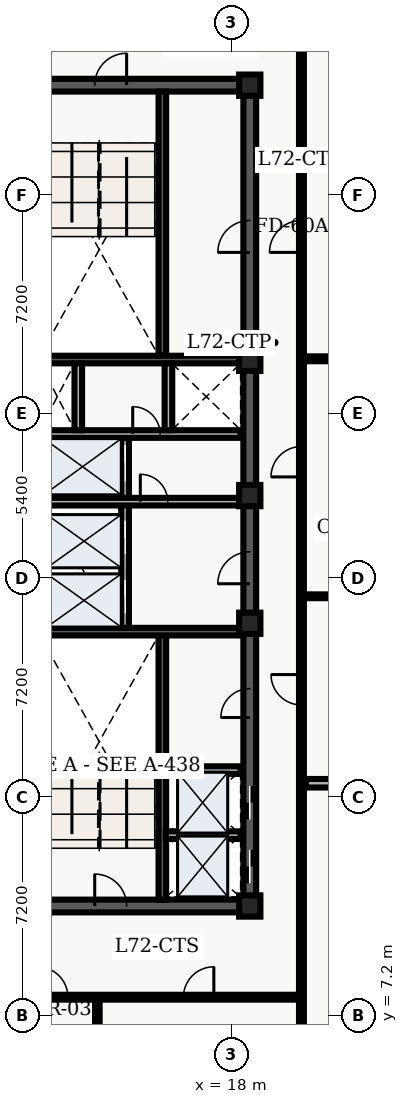
"""IFC4 building model, lengths in metres.
Left out: names, types, materials, properties, quantities, classifications, styles, units other than length and angle.
Written with IfcOpenShell. Run it as: python <this file> out.ifc"""

import sys

from ifc_helpers import new_model, entity, si_unit, converted_unit, direction, frame, origin_with_axes, origin_2d_with_axis, place, context, subcontext, project, spatial, polyline, rectangle, outline, extrude, element, fill, save


model = new_model("IFC4")
c1 = context("Model", 3, precision=1e-05, world=origin_with_axes(), true_north=direction((0.0, 1.0)))
c2 = subcontext(c1, "Body", "Model", "MODEL_VIEW")
j1 = project(units=[si_unit("LENGTHUNIT", "METRE"), converted_unit("PLANEANGLEUNIT", "DEGREE", entity("IfcPlaneAngleMeasure", 0.017), si_unit("PLANEANGLEUNIT", "RADIAN"), dimensions=[0, 0, 0, 0, 0, 0, 0])], contexts=[c1])
p1 = place(None, origin_with_axes())
s1 = spatial("IfcSite", under=j1, at=p1, CompositionType="ELEMENT")
p2 = place(p1, origin_with_axes())
s2 = spatial("IfcBuilding", under=s1, at=p2, CompositionType="ELEMENT")
p3 = place(p2, frame((0.0, 0.0, 291.9), z_axis=(0.0, 0.0, 1.0), x_axis=(1.0, 0.0, 0.0)))
s3 = spatial("IfcBuildingStorey", under=s2, at=p3, CompositionType="ELEMENT", Elevation=291.9)
p4 = place(p3, frame((11.4, 10.8, 0.0), z_axis=(0.0, 0.0, 1.0), x_axis=(1.0, 0.0, 0.0)))
e1 = element("IfcWall", 1, at=p4, inside=s3, PredefinedType="SHEAR", context=c2, shape_type="SweptSolid", body=[
    extrude(outline(polyline([(0.0, -0.21), (7.2, -0.21), (7.2, 0.21), (0.0, 0.21), (0.0, -0.21)])), origin_with_axes(), (0.0, 0.0, 1.0), 3.66),
])
p5 = place(p4, frame((2.625, 0.0, 0.0), z_axis=(0.0, 0.0, 1.0), x_axis=(1.0, 0.0, 0.0)))
e2 = element("IfcOpeningElement", 2, at=p5, cuts=e1, PredefinedType="OPENING", context=c2, shape_type="SweptSolid", body=[
    extrude(rectangle(XDim=1.05, YDim=0.44, at=origin_2d_with_axis()), origin_with_axes(), (0.0, 0.0, 1.0), 2.15),
])
p6 = place(p3, frame((11.4, 37.8, 0.0), z_axis=(0.0, 0.0, 1.0), x_axis=(1.0, 0.0, 0.0)))
e3 = element("IfcWall", 3, at=p6, inside=s3, PredefinedType="SHEAR", context=c2, shape_type="SweptSolid", body=[
    extrude(outline(polyline([(0.0, -0.21), (7.2, -0.21), (7.2, 0.21), (0.0, 0.21), (0.0, -0.21)])), origin_with_axes(), (0.0, 0.0, 1.0), 3.66),
])
p7 = place(p6, frame((2.625, 0.0, 0.0), z_axis=(0.0, 0.0, 1.0), x_axis=(1.0, 0.0, 0.0)))
e4 = element("IfcOpeningElement", 4, at=p7, cuts=e3, PredefinedType="OPENING", context=c2, shape_type="SweptSolid", body=[
    extrude(rectangle(XDim=1.05, YDim=0.44, at=origin_2d_with_axis()), origin_with_axes(), (0.0, 0.0, 1.0), 2.15),
])
p8 = place(p3, frame((18.6, 10.8, 0.0), z_axis=(0.0, 0.0, 1.0), x_axis=(0.0, 1.0, 0.0)))
e5 = element("IfcWall", 5, at=p8, inside=s3, PredefinedType="SHEAR", context=c2, shape_type="SweptSolid", body=[
    extrude(outline(polyline([(0.0, -0.21), (13.5, -0.21), (13.5, 0.21), (0.0, 0.21), (0.0, -0.21)])), origin_with_axes(), (0.0, 0.0, 1.0), 3.66),
])
p9 = place(p8, frame((1.3, 0.0, 0.0), z_axis=(0.0, 0.0, 1.0), x_axis=(1.0, 0.0, 0.0)))
e6 = element("IfcOpeningElement", 6, at=p9, cuts=e5, PredefinedType="OPENING", context=c2, shape_type="SweptSolid", body=[
    extrude(rectangle(XDim=1.1, YDim=0.44, at=origin_2d_with_axis()), origin_with_axes(), (0.0, 0.0, 1.0), 2.15),
])
p10 = place(p8, frame((3.4, 0.0, 0.0), z_axis=(0.0, 0.0, 1.0), x_axis=(1.0, 0.0, 0.0)))
e7 = element("IfcOpeningElement", 7, at=p10, cuts=e5, PredefinedType="OPENING", context=c2, shape_type="SweptSolid", body=[
    extrude(rectangle(XDim=1.1, YDim=0.44, at=origin_2d_with_axis()), origin_with_axes(), (0.0, 0.0, 1.0), 2.15),
])
p11 = place(p8, frame((11.125, 0.0, 0.0), z_axis=(0.0, 0.0, 1.0), x_axis=(1.0, 0.0, 0.0)))
e8 = element("IfcOpeningElement", 8, at=p11, cuts=e5, PredefinedType="OPENING", context=c2, shape_type="SweptSolid", body=[
    extrude(rectangle(XDim=1.05, YDim=0.44, at=origin_2d_with_axis()), origin_with_axes(), (0.0, 0.0, 1.0), 2.15),
])
p12 = place(p8, frame((6.675, 0.0, 0.0), z_axis=(0.0, 0.0, 1.0), x_axis=(1.0, 0.0, 0.0)))
e9 = element("IfcOpeningElement", 9, at=p12, cuts=e5, PredefinedType="OPENING", context=c2, shape_type="SweptSolid", body=[
    extrude(rectangle(XDim=0.95, YDim=0.44, at=origin_2d_with_axis()), origin_with_axes(), (0.0, 0.0, 1.0), 2.15),
])
p13 = place(p3, frame((18.6, 24.3, 0.0), z_axis=(0.0, 0.0, 1.0), x_axis=(0.0, 1.0, 0.0)))
e10 = element("IfcWall", 10, at=p13, inside=s3, PredefinedType="SHEAR", context=c2, shape_type="SweptSolid", body=[
    extrude(outline(polyline([(0.0, -0.21), (13.5, -0.21), (13.5, 0.21), (0.0, 0.21), (0.0, -0.21)])), origin_with_axes(), (0.0, 0.0, 1.0), 3.66),
])
p14 = place(p13, frame((8.525, 0.0, 0.0), z_axis=(0.0, 0.0, 1.0), x_axis=(1.0, 0.0, 0.0)))
e11 = element("IfcOpeningElement", 11, at=p14, cuts=e10, PredefinedType="OPENING", context=c2, shape_type="SweptSolid", body=[
    extrude(rectangle(XDim=1.05, YDim=0.44, at=origin_2d_with_axis()), origin_with_axes(), (0.0, 0.0, 1.0), 2.15),
])
p15 = place(p3, frame((15.725, 11.01, 0.0), z_axis=(0.0, 0.0, 1.0), x_axis=(0.0, 1.0, 0.0)))
e12 = element("IfcWall", 12, at=p15, inside=s3, PredefinedType="SHEAR", context=c2, shape_type="SweptSolid", body=[
    extrude(outline(polyline([(0.0, -0.125), (8.69, -0.125), (8.69, 0.125), (0.0, 0.125), (0.0, -0.125)])), origin_with_axes(), (0.0, 0.0, 1.0), 3.66),
])
p16 = place(p3, frame((11.61, 19.825, 0.0), z_axis=(0.0, 0.0, 1.0), x_axis=(1.0, 0.0, 0.0)))
e13 = element("IfcWall", 13, at=p16, inside=s3, PredefinedType="SHEAR", context=c2, shape_type="SweptSolid", body=[
    extrude(outline(polyline([(0.0, -0.125), (6.78, -0.125), (6.78, 0.125), (0.0, 0.125), (0.0, -0.125)])), origin_with_axes(), (0.0, 0.0, 1.0), 3.66),
])
p17 = place(p3, frame((15.725, 28.9, 0.0), z_axis=(0.0, 0.0, 1.0), x_axis=(0.0, 1.0, 0.0)))
e14 = element("IfcWall", 14, at=p17, inside=s3, PredefinedType="SHEAR", context=c2, shape_type="SweptSolid", body=[
    extrude(outline(polyline([(0.0, -0.125), (8.69, -0.125), (8.69, 0.125), (0.0, 0.125), (0.0, -0.125)])), origin_with_axes(), (0.0, 0.0, 1.0), 3.66),
])
p18 = place(p3, frame((11.61, 28.775, 0.0), z_axis=(0.0, 0.0, 1.0), x_axis=(1.0, 0.0, 0.0)))
e15 = element("IfcWall", 15, at=p18, inside=s3, PredefinedType="SHEAR", context=c2, shape_type="SweptSolid", body=[
    extrude(outline(polyline([(0.0, -0.125), (6.78, -0.125), (6.78, 0.125), (0.0, 0.125), (0.0, -0.125)])), origin_with_axes(), (0.0, 0.0, 1.0), 3.66),
])
p19 = place(p3, frame((14.5, 19.95, 0.0), z_axis=(0.0, 0.0, 1.0), x_axis=(0.0, 1.0, 0.0)))
e16 = element("IfcWall", 16, at=p19, inside=s3, PredefinedType="SOLIDWALL", context=c2, shape_type="SweptSolid", body=[
    extrude(outline(polyline([(0.0, -0.125), (6.25, -0.125), (6.25, 0.125), (0.0, 0.125), (0.0, -0.125)])), origin_with_axes(), (0.0, 0.0, 1.0), 2.7),
])
p20 = place(p19, frame((1.025, 0.0, 0.0), z_axis=(0.0, 0.0, 1.0), x_axis=(1.0, 0.0, 0.0)))
e17 = element("IfcOpeningElement", 17, at=p20, cuts=e16, PredefinedType="OPENING", context=c2, shape_type="SweptSolid", body=[
    extrude(rectangle(XDim=1.1, YDim=0.27, at=origin_2d_with_axis()), origin_with_axes(), (0.0, 0.0, 1.0), 2.15),
])
p21 = place(p19, frame((2.975, 0.0, 0.0), z_axis=(0.0, 0.0, 1.0), x_axis=(1.0, 0.0, 0.0)))
e18 = element("IfcOpeningElement", 18, at=p21, cuts=e16, PredefinedType="OPENING", context=c2, shape_type="SweptSolid", body=[
    extrude(rectangle(XDim=1.1, YDim=0.27, at=origin_2d_with_axis()), origin_with_axes(), (0.0, 0.0, 1.0), 2.15),
])
p22 = place(p19, frame((5.425, 0.0, 0.0), z_axis=(0.0, 0.0, 1.0), x_axis=(1.0, 0.0, 0.0)))
e19 = element("IfcOpeningElement", 19, at=p22, cuts=e16, PredefinedType="OPENING", context=c2, shape_type="SweptSolid", body=[
    extrude(rectangle(XDim=1.2, YDim=0.27, at=origin_2d_with_axis()), origin_with_axes(), (0.0, 0.0, 1.0), 2.15),
])
p23 = place(p3, frame((11.7, 24.1, 0.0), z_axis=(0.0, 0.0, 1.0), x_axis=(1.0, 0.0, 0.0)))
e20 = element("IfcWall", 20, at=p23, inside=s3, PredefinedType="SOLIDWALL", context=c2, shape_type="SweptSolid", body=[
    extrude(outline(polyline([(0.0, -0.125), (6.6, -0.125), (6.6, 0.125), (0.0, 0.125), (0.0, -0.125)])), origin_with_axes(), (0.0, 0.0, 1.0), 2.7),
])
p24 = place(p23, frame((3.75, 0.0, 0.0), z_axis=(0.0, 0.0, 1.0), x_axis=(1.0, 0.0, 0.0)))
e21 = element("IfcOpeningElement", 21, at=p24, cuts=e20, PredefinedType="OPENING", context=c2, shape_type="SweptSolid", body=[
    extrude(rectangle(XDim=0.9, YDim=0.27, at=origin_2d_with_axis()), origin_with_axes(), (0.0, 0.0, 1.0), 2.15),
])
p25 = place(p3, frame((11.7, 26.325, 0.0), z_axis=(0.0, 0.0, 1.0), x_axis=(1.0, 0.0, 0.0)))
e22 = element("IfcWall", 22, at=p25, inside=s3, PredefinedType="SOLIDWALL", context=c2, shape_type="SweptSolid", body=[
    extrude(outline(polyline([(0.0, -0.125), (6.6, -0.125), (6.6, 0.125), (0.0, 0.125), (0.0, -0.125)])), origin_with_axes(), (0.0, 0.0, 1.0), 2.7),
])
p26 = place(p25, frame((3.5, 0.0, 0.0), z_axis=(0.0, 0.0, 1.0), x_axis=(1.0, 0.0, 0.0)))
e23 = element("IfcOpeningElement", 23, at=p26, cuts=e22, PredefinedType="OPENING", context=c2, shape_type="SweptSolid", body=[
    extrude(rectangle(XDim=0.9, YDim=0.27, at=origin_2d_with_axis()), origin_with_axes(), (0.0, 0.0, 1.0), 2.15),
])
for number, where, z_axis, x_axis in (
    (24, (12.96, 26.45, 0.0), (0.0, 0.0, 1.0), (0.0, 1.0, 0.0)),
    (25, (15.925, 26.45, 0.0), (0.0, 0.0, 1.0), (0.0, 1.0, 0.0)),
):
    element("IfcWall", number, at=place(p3, frame(where, z_axis=z_axis, x_axis=x_axis)), inside=s3, PredefinedType="SOLIDWALL", context=c2, shape_type="SweptSolid", body=[
        extrude(outline(polyline([(0.0, -0.125), (2.2, -0.125), (2.2, 0.125), (0.0, 0.125), (0.0, -0.125)])), origin_with_axes(), (0.0, 0.0, 1.0), 2.7),
    ])
for number, where, z_axis, x_axis in (
    (26, (18.6, 10.8, 0.0), (0.0, 0.0, 1.0), (1.0, 0.0, 0.0)),
    (27, (18.6, 20.1, 0.0), (0.0, 0.0, 1.0), (1.0, 0.0, 0.0)),
    (28, (18.6, 24.3, 0.0), (0.0, 0.0, 1.0), (1.0, 0.0, 0.0)),
    (29, (18.6, 28.75, 0.0), (0.0, 0.0, 1.0), (1.0, 0.0, 0.0)),
    (30, (18.6, 37.8, 0.0), (0.0, 0.0, 1.0), (1.0, 0.0, 0.0)),
):
    element("IfcColumn", number, at=place(p3, frame(where, z_axis=z_axis, x_axis=x_axis)), inside=s3, PredefinedType="COLUMN", context=c2, shape_type="SweptSolid", body=[
        extrude(rectangle(XDim=0.7, YDim=0.7, at=origin_2d_with_axis()), origin_with_axes(), (0.0, 0.0, 1.0), 3.9),
    ])
for number, where, z_axis, x_axis in (
    (31, (15.84, 13.13, 0.0), (0.0, 0.0, 1.0), (1.0, 0.0, 0.0)),
    (32, (15.84, 15.27, 0.0), (0.0, 0.0, 1.0), (1.0, 0.0, 0.0)),
):
    element("IfcWall", number, at=place(p3, frame(where, z_axis=z_axis, x_axis=x_axis)), inside=s3, PredefinedType="SOLIDWALL", context=c2, shape_type="SweptSolid", body=[
        extrude(outline(polyline([(0.0, -0.125), (2.46, -0.125), (2.46, 0.125), (0.0, 0.125), (0.0, -0.125)])), origin_with_axes(), (0.0, 0.0, 1.0), 2.7),
    ])
p27 = place(p3, frame((8.135, 7.8, 0.0), z_axis=(0.0, 0.0, 1.0), x_axis=(1.0, 0.0, 0.0)))
e33 = element("IfcWall", 33, at=p27, inside=s3, PredefinedType="PARTITIONING", context=c2, shape_type="SweptSolid", body=[
    extrude(outline(polyline([(0.0, -0.08), (12.165, -0.08), (12.165, 0.08), (0.0, 0.08), (0.0, -0.08)])), origin_with_axes(), (0.0, 0.0, 1.0), 2.7),
])
p28 = place(p27, frame((3.983, 0.0, 0.0), z_axis=(0.0, 0.0, 1.0), x_axis=(1.0, 0.0, 0.0)))
e34 = element("IfcOpeningElement", 34, at=p28, cuts=e33, PredefinedType="OPENING", context=c2, shape_type="SweptSolid", body=[
    extrude(rectangle(XDim=1.0, YDim=0.18, at=origin_2d_with_axis()), origin_with_axes(), (0.0, 0.0, 1.0), 2.15),
])
p29 = place(p27, frame((8.784, 0.0, 0.0), z_axis=(0.0, 0.0, 1.0), x_axis=(1.0, 0.0, 0.0)))
e35 = element("IfcOpeningElement", 35, at=p29, cuts=e33, PredefinedType="OPENING", context=c2, shape_type="SweptSolid", body=[
    extrude(rectangle(XDim=1.0, YDim=0.18, at=origin_2d_with_axis()), origin_with_axes(), (0.0, 0.0, 1.0), 2.15),
])
p30 = place(p3, frame((20.3, 0.335, 0.0), z_axis=(0.0, 0.0, 1.0), x_axis=(0.0, 1.0, 0.0)))
e36 = element("IfcWall", 36, at=p30, inside=s3, PredefinedType="PARTITIONING", context=c2, shape_type="SweptSolid", body=[
    extrude(outline(polyline([(0.0, -0.08), (40.165, -0.08), (40.165, 0.08), (0.0, 0.08), (0.0, -0.08)])), origin_with_axes(), (0.0, 0.0, 1.0), 2.7),
])
p31 = place(p30, frame((32.49, 0.0, 0.0), z_axis=(0.0, 0.0, 1.0), x_axis=(1.0, 0.0, 0.0)))
e37 = element("IfcOpeningElement", 37, at=p31, cuts=e36, PredefinedType="OPENING", context=c2, shape_type="SweptSolid", body=[
    extrude(rectangle(XDim=1.05, YDim=0.18, at=origin_2d_with_axis()), origin_with_axes(), (0.0, 0.0, 1.0), 2.15),
])
p32 = place(p30, frame((5.089, 0.0, 0.0), z_axis=(0.0, 0.0, 1.0), x_axis=(1.0, 0.0, 0.0)))
e38 = element("IfcOpeningElement", 38, at=p32, cuts=e36, PredefinedType="OPENING", context=c2, shape_type="SweptSolid", body=[
    extrude(rectangle(XDim=1.0, YDim=0.18, at=origin_2d_with_axis()), origin_with_axes(), (0.0, 0.0, 1.0), 2.15),
])
p33 = place(p30, frame((17.578, 0.0, 0.0), z_axis=(0.0, 0.0, 1.0), x_axis=(1.0, 0.0, 0.0)))
e39 = element("IfcOpeningElement", 39, at=p33, cuts=e36, PredefinedType="OPENING", context=c2, shape_type="SweptSolid", body=[
    extrude(rectangle(XDim=1.0, YDim=0.18, at=origin_2d_with_axis()), origin_with_axes(), (0.0, 0.0, 1.0), 2.15),
])
p34 = place(p30, frame((25.079, 0.0, 0.0), z_axis=(0.0, 0.0, 1.0), x_axis=(1.0, 0.0, 0.0)))
e40 = element("IfcOpeningElement", 40, at=p34, cuts=e36, PredefinedType="OPENING", context=c2, shape_type="SweptSolid", body=[
    extrude(rectangle(XDim=1.0, YDim=0.18, at=origin_2d_with_axis()), origin_with_axes(), (0.0, 0.0, 1.0), 2.15),
])
p35 = place(p3, frame((20.3, 28.8, 0.0), z_axis=(0.0, 0.0, 1.0), x_axis=(1.0, 0.0, 0.0)))
e41 = element("IfcWall", 41, at=p35, inside=s3, PredefinedType="PARTITIONING", context=c2, shape_type="SweptSolid", body=[
    extrude(outline(polyline([(0.0, -0.08), (3.32, -0.08), (3.32, 0.08), (0.0, 0.08), (0.0, -0.08)])), origin_with_axes(), (0.0, 0.0, 1.0), 2.7),
])
p36 = place(p3, frame((13.587, 2.58, 0.0), z_axis=(0.0, 0.0, 1.0), x_axis=(0.0, 1.0, 0.0)))
e42 = element("IfcWall", 42, at=p36, inside=s3, PredefinedType="PARTITIONING", context=c2, shape_type="SweptSolid", body=[
    extrude(outline(polyline([(0.0, -0.075), (5.12, -0.075), (5.12, 0.075), (0.0, 0.075), (0.0, -0.075)])), origin_with_axes(), (0.0, 0.0, 1.0), 2.7),
])
p37 = place(p3, frame((20.45, 14.838, 0.0), z_axis=(0.0, 0.0, 1.0), x_axis=(1.0, 0.0, 0.0)))
e43 = element("IfcWall", 43, at=p37, inside=s3, PredefinedType="PARTITIONING", context=c2, shape_type="SweptSolid", body=[
    extrude(outline(polyline([(0.0, -0.14), (13.415, -0.14), (13.415, 0.14), (0.0, 0.14), (0.0, -0.14)])), origin_with_axes(), (0.0, 0.0, 1.0), 2.7),
])
p38 = place(p3, frame((20.45, 20.988, 0.0), z_axis=(0.0, 0.0, 1.0), x_axis=(1.0, 0.0, 0.0)))
e44 = element("IfcWall", 44, at=p38, inside=s3, PredefinedType="PARTITIONING", context=c2, shape_type="SweptSolid", body=[
    extrude(outline(polyline([(0.0, -0.062), (13.415, -0.062), (13.415, 0.062), (0.0, 0.062), (0.0, -0.062)])), origin_with_axes(), (0.0, 0.0, 1.0), 2.7),
])
p39 = place(p8, frame((1.3, 0.0, 0.0), z_axis=(0.0, 0.0, 1.0), x_axis=(1.0, 0.0, 0.0)))
e45 = element("IfcDoor", 45, at=p39, inside=s3, OperationType="SLIDING_TO_LEFT", PredefinedType="DOOR", context=c2, shape_type="SweptSolid", body=[
    extrude(rectangle(XDim=1.1, YDim=0.09, at=origin_2d_with_axis()), origin_with_axes(), (0.0, 0.0, 1.0), 2.15),
])
fill(e6, e45)
p40 = place(p8, frame((3.4, 0.0, 0.0), z_axis=(0.0, 0.0, 1.0), x_axis=(1.0, 0.0, 0.0)))
e46 = element("IfcDoor", 46, at=p40, inside=s3, OperationType="SLIDING_TO_RIGHT", PredefinedType="DOOR", context=c2, shape_type="SweptSolid", body=[
    extrude(rectangle(XDim=1.1, YDim=0.09, at=origin_2d_with_axis()), origin_with_axes(), (0.0, 0.0, 1.0), 2.15),
])
fill(e7, e46)
p41 = place(p19, frame((1.025, 0.0, 0.0), z_axis=(0.0, 0.0, 1.0), x_axis=(1.0, 0.0, 0.0)))
e47 = element("IfcDoor", 47, at=p41, inside=s3, OperationType="SLIDING_TO_LEFT", PredefinedType="DOOR", context=c2, shape_type="SweptSolid", body=[
    extrude(rectangle(XDim=1.1, YDim=0.09, at=origin_2d_with_axis()), origin_with_axes(), (0.0, 0.0, 1.0), 2.15),
])
fill(e17, e47)
p42 = place(p19, frame((2.975, 0.0, 0.0), z_axis=(0.0, 0.0, 1.0), x_axis=(1.0, 0.0, 0.0)))
e48 = element("IfcDoor", 48, at=p42, inside=s3, OperationType="SLIDING_TO_RIGHT", PredefinedType="DOOR", context=c2, shape_type="SweptSolid", body=[
    extrude(rectangle(XDim=1.1, YDim=0.09, at=origin_2d_with_axis()), origin_with_axes(), (0.0, 0.0, 1.0), 2.15),
])
fill(e18, e48)
p43 = place(p19, frame((5.425, 0.0, 0.0), z_axis=(0.0, 0.0, 1.0), x_axis=(1.0, 0.0, 0.0)))
e49 = element("IfcDoor", 49, at=p43, inside=s3, OperationType="DOUBLE_DOOR_SLIDING", PredefinedType="DOOR", context=c2, shape_type="SweptSolid", body=[
    extrude(rectangle(XDim=1.2, YDim=0.09, at=origin_2d_with_axis()), origin_with_axes(), (0.0, 0.0, 1.0), 2.15),
])
fill(e19, e49)
p44 = place(p4, frame((2.625, 0.0, 0.0), z_axis=(0.0, 0.0, 1.0), x_axis=(1.0, 0.0, 0.0)))
e50 = element("IfcDoor", 50, at=p44, inside=s3, OperationType="SINGLE_SWING_LEFT", PredefinedType="DOOR", context=c2, shape_type="SweptSolid", body=[
    extrude(rectangle(XDim=1.05, YDim=0.09, at=origin_2d_with_axis()), origin_with_axes(), (0.0, 0.0, 1.0), 2.15),
])
fill(e2, e50)
p45 = place(p6, frame((2.625, 0.0, 0.0), z_axis=(0.0, 0.0, 1.0), x_axis=(1.0, 0.0, 0.0)))
e51 = element("IfcDoor", 51, at=p45, inside=s3, OperationType="SINGLE_SWING_RIGHT", PredefinedType="DOOR", context=c2, shape_type="SweptSolid", body=[
    extrude(rectangle(XDim=1.05, YDim=0.09, at=origin_2d_with_axis()), origin_with_axes(), (0.0, 0.0, 1.0), 2.15),
])
fill(e4, e51)
p46 = place(p8, frame((11.125, 0.0, 0.0), z_axis=(0.0, 0.0, 1.0), x_axis=(1.0, 0.0, 0.0)))
e52 = element("IfcDoor", 52, at=p46, inside=s3, OperationType="SINGLE_SWING_LEFT", PredefinedType="DOOR", context=c2, shape_type="SweptSolid", body=[
    extrude(rectangle(XDim=1.05, YDim=0.09, at=origin_2d_with_axis()), origin_with_axes(), (0.0, 0.0, 1.0), 2.15),
])
fill(e8, e52)
p47 = place(p23, frame((3.75, 0.0, 0.0), z_axis=(0.0, 0.0, 1.0), x_axis=(1.0, 0.0, 0.0)))
e53 = element("IfcDoor", 53, at=p47, inside=s3, OperationType="SINGLE_SWING_LEFT", PredefinedType="DOOR", context=c2, shape_type="SweptSolid", body=[
    extrude(rectangle(XDim=0.9, YDim=0.09, at=origin_2d_with_axis()), origin_with_axes(), (0.0, 0.0, 1.0), 2.15),
])
fill(e21, e53)
p48 = place(p25, frame((3.5, 0.0, 0.0), z_axis=(0.0, 0.0, 1.0), x_axis=(1.0, 0.0, 0.0)))
e54 = element("IfcDoor", 54, at=p48, inside=s3, OperationType="SINGLE_SWING_LEFT", PredefinedType="DOOR", context=c2, shape_type="SweptSolid", body=[
    extrude(rectangle(XDim=0.9, YDim=0.09, at=origin_2d_with_axis()), origin_with_axes(), (0.0, 0.0, 1.0), 2.15),
])
fill(e23, e54)
p49 = place(p8, frame((6.675, 0.0, 0.0), z_axis=(0.0, 0.0, 1.0), x_axis=(1.0, 0.0, 0.0)))
e55 = element("IfcDoor", 55, at=p49, inside=s3, OperationType="SINGLE_SWING_LEFT", PredefinedType="DOOR", context=c2, shape_type="SweptSolid", body=[
    extrude(rectangle(XDim=0.95, YDim=0.09, at=origin_2d_with_axis()), origin_with_axes(), (0.0, 0.0, 1.0), 2.15),
])
fill(e9, e55)
p50 = place(p13, frame((8.525, 0.0, 0.0), z_axis=(0.0, 0.0, 1.0), x_axis=(1.0, 0.0, 0.0)))
e56 = element("IfcDoor", 56, at=p50, inside=s3, OperationType="SINGLE_SWING_LEFT", PredefinedType="DOOR", context=c2, shape_type="SweptSolid", body=[
    extrude(rectangle(XDim=1.05, YDim=0.09, at=origin_2d_with_axis()), origin_with_axes(), (0.0, 0.0, 1.0), 2.15),
])
fill(e11, e56)
p51 = place(p30, frame((32.49, 0.0, 0.0), z_axis=(0.0, 0.0, 1.0), x_axis=(1.0, 0.0, 0.0)))
e57 = element("IfcDoor", 57, at=p51, inside=s3, OperationType="SINGLE_SWING_LEFT", PredefinedType="DOOR", context=c2, shape_type="SweptSolid", body=[
    extrude(rectangle(XDim=1.05, YDim=0.09, at=origin_2d_with_axis()), origin_with_axes(), (0.0, 0.0, 1.0), 2.15),
])
fill(e37, e57)
p52 = place(p27, frame((3.983, 0.0, 0.0), z_axis=(0.0, 0.0, 1.0), x_axis=(1.0, 0.0, 0.0)))
e58 = element("IfcDoor", 58, at=p52, inside=s3, OperationType="SINGLE_SWING_LEFT", PredefinedType="DOOR", context=c2, shape_type="SweptSolid", body=[
    extrude(rectangle(XDim=1.0, YDim=0.09, at=origin_2d_with_axis()), origin_with_axes(), (0.0, 0.0, 1.0), 2.15),
])
fill(e34, e58)
p53 = place(p27, frame((8.784, 0.0, 0.0), z_axis=(0.0, 0.0, 1.0), x_axis=(1.0, 0.0, 0.0)))
e59 = element("IfcDoor", 59, at=p53, inside=s3, OperationType="SINGLE_SWING_RIGHT", PredefinedType="DOOR", context=c2, shape_type="SweptSolid", body=[
    extrude(rectangle(XDim=1.0, YDim=0.09, at=origin_2d_with_axis()), origin_with_axes(), (0.0, 0.0, 1.0), 2.15),
])
fill(e35, e59)
p54 = place(p30, frame((17.578, 0.0, 0.0), z_axis=(0.0, 0.0, 1.0), x_axis=(1.0, 0.0, 0.0)))
e60 = element("IfcDoor", 60, at=p54, inside=s3, OperationType="SINGLE_SWING_RIGHT", PredefinedType="DOOR", context=c2, shape_type="SweptSolid", body=[
    extrude(rectangle(XDim=1.0, YDim=0.09, at=origin_2d_with_axis()), origin_with_axes(), (0.0, 0.0, 1.0), 2.15),
])
fill(e39, e60)
p55 = place(p30, frame((25.079, 0.0, 0.0), z_axis=(0.0, 0.0, 1.0), x_axis=(1.0, 0.0, 0.0)))
e61 = element("IfcDoor", 61, at=p55, inside=s3, OperationType="SINGLE_SWING_LEFT", PredefinedType="DOOR", context=c2, shape_type="SweptSolid", body=[
    extrude(rectangle(XDim=1.0, YDim=0.09, at=origin_2d_with_axis()), origin_with_axes(), (0.0, 0.0, 1.0), 2.15),
])
fill(e40, e61)
save(model, sys.argv[1])
